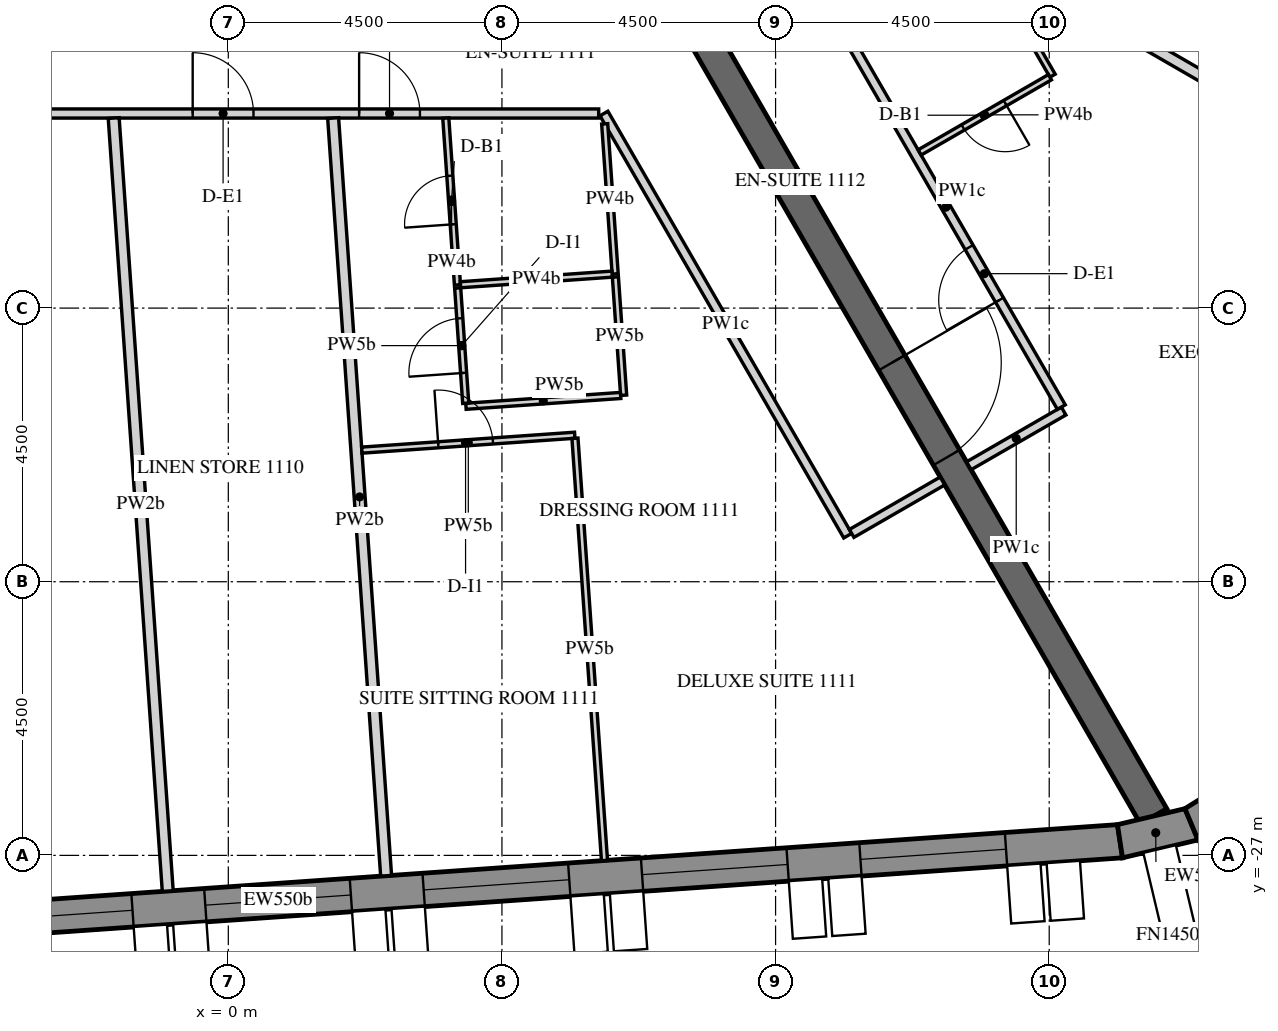
"""IFC4 building model, lengths in metres.
Left out: names, types, materials, properties, quantities, classifications, styles, units other than length and angle.
Written with IfcOpenShell. Run it as: python <this file> out.ifc"""

import sys

from ifc_helpers import new_model, si_unit, direction, frame, frame_2d, origin, place, context, subcontext, project, spatial, polyline, rectangle, outline, extrude, element, fill, save


model = new_model("IFC4")
c1 = context("Model", 3, precision=1e-05, world=origin(), true_north=direction((0.0, 1.0)))
c2 = subcontext(c1, "Body", "Model", "MODEL_VIEW")
j1 = project(units=[si_unit("LENGTHUNIT", "METRE"), si_unit("PLANEANGLEUNIT", "RADIAN")], contexts=[c1])
p1 = place(None, origin())
s1 = spatial("IfcSite", under=j1, at=p1, CompositionType="ELEMENT")
p2 = place(p1, origin())
s2 = spatial("IfcBuilding", under=s1, at=p2, CompositionType="ELEMENT")
p3 = place(p2, frame((0.0, 0.0, 152.7)))
s3 = spatial("IfcBuildingStorey", under=s2, at=p3, CompositionType="ELEMENT", Elevation=152.7)
p4 = place(p3, frame((-13.026, -28.704, 0.0), z_axis=(0.0, 0.0, 1.0), x_axis=(0.99756406806, 0.069756219185, 0.0)))
e1 = element("IfcWall", 1, at=p4, inside=s3, PredefinedType="SOLIDWALL", context=c2, shape_type="SweptSolid", body=[
    extrude(outline(polyline([(-0.026, -0.275), (27.78, -0.275), (27.735, 0.275), (0.026, 0.275), (-0.026, -0.275)])), origin(), (0.0, 0.0, 1.0), 3.75),
])
p5 = place(p4, frame((1.879, 0.0, 0.9)))
e2 = element("IfcOpeningElement", 2, at=p5, cuts=e1, PredefinedType="OPENING", context=c2, shape_type="SweptSolid", body=[
    extrude(rectangle(XDim=2.4, YDim=2.4, at=frame_2d((1.2, 1.2))), frame((0.0, 0.285, 0.0), z_axis=(0.0, -1.0, 0.0), x_axis=(1.0, 0.0, 0.0)), (0.0, 0.0, 1.0), 0.57),
])
p6 = place(p4, frame((5.479, 0.0, 0.9)))
e3 = element("IfcOpeningElement", 3, at=p6, cuts=e1, PredefinedType="OPENING", context=c2, shape_type="SweptSolid", body=[
    extrude(rectangle(XDim=2.4, YDim=2.4, at=frame_2d((1.2, 1.2))), frame((0.0, 0.285, 0.0), z_axis=(0.0, -1.0, 0.0), x_axis=(1.0, 0.0, 0.0)), (0.0, 0.0, 1.0), 0.57),
])
p7 = place(p4, frame((9.079, 0.0, 0.9)))
e4 = element("IfcOpeningElement", 4, at=p7, cuts=e1, PredefinedType="OPENING", context=c2, shape_type="SweptSolid", body=[
    extrude(rectangle(XDim=2.4, YDim=2.4, at=frame_2d((1.2, 1.2))), frame((0.0, 0.285, 0.0), z_axis=(0.0, -1.0, 0.0), x_axis=(1.0, 0.0, 0.0)), (0.0, 0.0, 1.0), 0.57),
])
p8 = place(p4, frame((12.679, 0.0, 0.9)))
e5 = element("IfcOpeningElement", 5, at=p8, cuts=e1, PredefinedType="OPENING", context=c2, shape_type="SweptSolid", body=[
    extrude(rectangle(XDim=2.4, YDim=2.4, at=frame_2d((1.2, 1.2))), frame((0.0, 0.285, 0.0), z_axis=(0.0, -1.0, 0.0), x_axis=(1.0, 0.0, 0.0)), (0.0, 0.0, 1.0), 0.57),
])
p9 = place(p4, frame((16.279, 0.0, 0.9)))
e6 = element("IfcOpeningElement", 6, at=p9, cuts=e1, PredefinedType="OPENING", context=c2, shape_type="SweptSolid", body=[
    extrude(rectangle(XDim=2.4, YDim=2.4, at=frame_2d((1.2, 1.2))), frame((0.0, 0.285, 0.0), z_axis=(0.0, -1.0, 0.0), x_axis=(1.0, 0.0, 0.0)), (0.0, 0.0, 1.0), 0.57),
])
p10 = place(p4, frame((19.879, 0.0, 0.9)))
e7 = element("IfcOpeningElement", 7, at=p10, cuts=e1, PredefinedType="OPENING", context=c2, shape_type="SweptSolid", body=[
    extrude(rectangle(XDim=2.4, YDim=2.4, at=frame_2d((1.2, 1.2))), frame((0.0, 0.285, 0.0), z_axis=(0.0, -1.0, 0.0), x_axis=(1.0, 0.0, 0.0)), (0.0, 0.0, 1.0), 0.57),
])
p11 = place(p4, frame((23.479, 0.0, 0.9)))
e8 = element("IfcOpeningElement", 8, at=p11, cuts=e1, PredefinedType="OPENING", context=c2, shape_type="SweptSolid", body=[
    extrude(rectangle(XDim=2.4, YDim=2.4, at=frame_2d((1.2, 1.2))), frame((0.0, 0.285, 0.0), z_axis=(0.0, -1.0, 0.0), x_axis=(1.0, 0.0, 0.0)), (0.0, 0.0, 1.0), 0.57),
])
p12 = place(p3, frame((14.664, -26.767, 0.0), z_axis=(0.0, 0.0, 1.0), x_axis=(0.973063591128, 0.230536868247, 0.0)))
e9 = element("IfcWall", 9, at=p12, inside=s3, PredefinedType="SOLIDWALL", context=c2, shape_type="SweptSolid", body=[
    extrude(outline(polyline([(-0.022, -0.275), (1.253, -0.275), (1.163, 0.275), (0.022, 0.275), (-0.022, -0.275)])), origin(), (0.0, 0.0, 1.0), 3.75),
])
p13 = place(p3, frame((15.84, -26.489, 0.0), z_axis=(0.0, 0.0, 1.0), x_axis=(0.848009655012, 0.52998077796, 0.0)))
e10 = element("IfcWall", 10, at=p13, inside=s3, PredefinedType="SOLIDWALL", context=c2, shape_type="SweptSolid", body=[
    extrude(outline(polyline([(-0.045, -0.275), (1.253, -0.275), (1.163, 0.275), (0.045, 0.275), (-0.045, -0.275)])), origin(), (0.0, 0.0, 1.0), 3.75),
])
p14 = place(p3, frame((7.506, -13.0, 0.0), z_axis=(0.0, 0.0, 1.0), x_axis=(0.499988271576, -0.866032175087, 0.0)))
e11 = element("IfcWall", 11, at=p14, inside=s3, PredefinedType="SHEAR", context=c2, shape_type="SweptSolid", body=[
    extrude(rectangle(XDim=15.424, YDim=0.5, at=frame_2d((7.712, 0.0))), origin(), (0.0, 0.0, 1.0), 3.75),
])
p15 = place(p14, frame((6.812, 0.0, 0.0)))
e12 = element("IfcOpeningElement", 12, at=p15, cuts=e11, PredefinedType="OPENING", context=c2, shape_type="SweptSolid", body=[
    extrude(rectangle(XDim=1.8, YDim=2.4, at=frame_2d((0.9, 1.2))), frame((0.0, 0.26, 0.0), z_axis=(0.0, -1.0, 0.0), x_axis=(1.0, 0.0, 0.0)), (0.0, 0.0, 1.0), 0.52),
])
p16 = place(p3, frame((-8.458, -14.8, 0.0), z_axis=(0.0, 0.0, 1.0), x_axis=(1.0, 0.0, 0.0)))
e13 = element("IfcWall", 13, at=p16, inside=s3, PredefinedType="PARTITIONING", context=c2, shape_type="SweptSolid", body=[
    extrude(rectangle(XDim=14.549, YDim=0.15, at=frame_2d((7.275, 0.0))), origin(), (0.0, 0.0, 1.0), 2.823),
])
p17 = place(p16, frame((4.375, 0.0, 0.0)))
e14 = element("IfcOpeningElement", 14, at=p17, cuts=e13, PredefinedType="OPENING", context=c2, shape_type="SweptSolid", body=[
    extrude(rectangle(XDim=1.0, YDim=2.1, at=frame_2d((0.5, 1.05))), frame((0.0, 0.085, 0.0), z_axis=(0.0, -1.0, 0.0), x_axis=(1.0, 0.0, 0.0)), (0.0, 0.0, 1.0), 0.17),
])
p18 = place(p16, frame((7.872, 0.0, 0.0)))
e15 = element("IfcOpeningElement", 15, at=p18, cuts=e13, PredefinedType="OPENING", context=c2, shape_type="SweptSolid", body=[
    extrude(rectangle(XDim=1.0, YDim=2.1, at=frame_2d((0.5, 1.05))), frame((0.0, 0.085, 0.0), z_axis=(0.0, -1.0, 0.0), x_axis=(1.0, 0.0, 0.0)), (0.0, 0.0, 1.0), 0.17),
])
p19 = place(p16, frame((10.609, 0.0, 0.0)))
e16 = element("IfcOpeningElement", 16, at=p19, cuts=e13, PredefinedType="OPENING", context=c2, shape_type="SweptSolid", body=[
    extrude(rectangle(XDim=1.0, YDim=2.1, at=frame_2d((0.5, 1.05))), frame((0.0, 0.085, 0.0), z_axis=(0.0, -1.0, 0.0), x_axis=(1.0, 0.0, 0.0)), (0.0, 0.0, 1.0), 0.17),
])
p20 = place(p3, frame((6.178, -14.8, 0.0), z_axis=(0.0, 0.0, 1.0), x_axis=(0.499984309814, -0.866034462328, 0.0)))
e17 = element("IfcWall", 17, at=p20, inside=s3, PredefinedType="PARTITIONING", context=c2, shape_type="SweptSolid", body=[
    extrude(rectangle(XDim=8.017, YDim=0.15, at=frame_2d((4.008, 0.0))), origin(), (0.0, 0.0, 1.0), 2.823),
])
p21 = place(p3, frame((10.251, -21.705, 0.0), z_axis=(0.0, 0.0, 1.0), x_axis=(0.866013532718, 0.500020560727, 0.0)))
e18 = element("IfcWall", 18, at=p21, inside=s3, PredefinedType="PARTITIONING", context=c2, shape_type="SweptSolid", body=[
    extrude(rectangle(XDim=1.725, YDim=0.15, at=frame_2d((0.863, 0.0))), origin(), (0.0, 0.0, 1.0), 2.823),
])
p22 = place(p3, frame((12.178, -20.593, 0.0), z_axis=(0.0, 0.0, 1.0), x_axis=(0.866047807691, 0.499961193289, 0.0)))
e19 = element("IfcWall", 19, at=p22, inside=s3, PredefinedType="PARTITIONING", context=c2, shape_type="SweptSolid", body=[
    extrude(rectangle(XDim=1.8, YDim=0.15, at=frame_2d((0.9, 0.0))), origin(), (0.0, 0.0, 1.0), 2.823),
])
p23 = place(p3, frame((13.699, -19.628, 0.0), z_axis=(0.0, 0.0, 1.0), x_axis=(-0.499998968938, 0.866025999068, 0.0)))
e20 = element("IfcWall", 20, at=p23, inside=s3, PredefinedType="PARTITIONING", context=c2, shape_type="SweptSolid", body=[
    extrude(rectangle(XDim=7.592, YDim=0.15, at=frame_2d((3.796, 0.0))), origin(), (0.0, 0.0, 1.0), 2.823),
])
p24 = place(p23, frame((2.033, 0.0, 0.0)))
e21 = element("IfcOpeningElement", 21, at=p24, cuts=e20, PredefinedType="OPENING", context=c2, shape_type="SweptSolid", body=[
    extrude(rectangle(XDim=1.0, YDim=2.1, at=frame_2d((0.5, 1.05))), frame((0.0, 0.085, 0.0), z_axis=(0.0, -1.0, 0.0), x_axis=(1.0, 0.0, 0.0)), (0.0, 0.0, 1.0), 0.17),
])
p25 = place(p3, frame((-0.996, -27.587, 0.0), z_axis=(0.0, 0.0, 1.0), x_axis=(-0.069758774678, 0.99756388936, 0.0)))
e22 = element("IfcWall", 22, at=p25, inside=s3, PredefinedType="PARTITIONING", context=c2, shape_type="SweptSolid", body=[
    extrude(rectangle(XDim=12.743, YDim=0.18, at=frame_2d((6.371, 0.0))), origin(), (0.0, 0.0, 1.0), 2.823),
])
p26 = place(p3, frame((2.595, -27.335, 0.0), z_axis=(0.0, 0.0, 1.0), x_axis=(-0.069757939761, 0.997563947745, 0.0)))
e23 = element("IfcWall", 23, at=p26, inside=s3, PredefinedType="PARTITIONING", context=c2, shape_type="SweptSolid", body=[
    extrude(rectangle(XDim=12.491, YDim=0.18, at=frame_2d((6.246, 0.0))), origin(), (0.0, 0.0, 1.0), 2.823),
])
p27 = place(p3, frame((3.769, -17.619, 0.0), z_axis=(0.0, 0.0, 1.0), x_axis=(-0.06975229722, 0.997564342302, 0.0)))
e24 = element("IfcWall", 24, at=p27, inside=s3, PredefinedType="PARTITIONING", context=c2, shape_type="SweptSolid", body=[
    extrude(rectangle(XDim=2.751, YDim=0.1, at=frame_2d((1.375, 0.0))), origin(), (0.0, 0.0, 1.0), 2.823),
])
p28 = place(p27, frame((1.0, 0.0, 0.0)))
e25 = element("IfcOpeningElement", 25, at=p28, cuts=e24, PredefinedType="OPENING", context=c2, shape_type="SweptSolid", body=[
    extrude(rectangle(XDim=0.8, YDim=2.1, at=frame_2d((0.4, 1.05))), frame((0.0, 0.06, 0.0), z_axis=(0.0, -1.0, 0.0), x_axis=(1.0, 0.0, 0.0)), (0.0, 0.0, 1.0), 0.12),
])
p29 = place(p3, frame((6.19, -14.971, 0.0), z_axis=(0.0, 0.0, 1.0), x_axis=(0.069689641529, -0.997568721374, 0.0)))
e26 = element("IfcWall", 26, at=p29, inside=s3, PredefinedType="PARTITIONING", context=c2, shape_type="SweptSolid", body=[
    extrude(rectangle(XDim=2.473, YDim=0.1, at=frame_2d((1.237, 0.0))), origin(), (0.0, 0.0, 1.0), 2.823),
])
p30 = place(p3, frame((6.366, -17.488, 0.0), z_axis=(0.0, 0.0, 1.0), x_axis=(0.069743152354, -0.997564981693, 0.0)))
e27 = element("IfcWall", 27, at=p30, inside=s3, PredefinedType="PARTITIONING", context=c2, shape_type="SweptSolid", body=[
    extrude(rectangle(XDim=1.95, YDim=0.1, at=frame_2d((0.975, 0.0))), origin(), (0.0, 0.0, 1.0), 2.823),
])
p31 = place(p3, frame((6.452, -19.437, 0.0), z_axis=(0.0, 0.0, 1.0), x_axis=(-0.997567829494, -0.069702407128, 0.0)))
e28 = element("IfcWall", 28, at=p31, inside=s3, PredefinedType="PARTITIONING", context=c2, shape_type="SweptSolid", body=[
    extrude(rectangle(XDim=2.55, YDim=0.1, at=frame_2d((1.275, 0.0))), origin(), (0.0, 0.0, 1.0), 2.823),
])
p32 = place(p3, frame((3.905, -19.565, 0.0), z_axis=(0.0, 0.0, 1.0), x_axis=(-0.069767755139, 0.997563261324, 0.0)))
e29 = element("IfcWall", 29, at=p32, inside=s3, PredefinedType="PARTITIONING", context=c2, shape_type="SweptSolid", body=[
    extrude(rectangle(XDim=1.9, YDim=0.1, at=frame_2d((0.95, 0.0))), origin(), (0.0, 0.0, 1.0), 2.823),
])
p33 = place(p32, frame((0.5, 0.0, 0.0)))
e30 = element("IfcOpeningElement", 30, at=p33, cuts=e29, PredefinedType="OPENING", context=c2, shape_type="SweptSolid", body=[
    extrude(rectangle(XDim=0.9, YDim=2.1, at=frame_2d((0.45, 1.05))), frame((0.0, 0.06, 0.0), z_axis=(0.0, -1.0, 0.0), x_axis=(1.0, 0.0, 0.0)), (0.0, 0.0, 1.0), 0.12),
])
p34 = place(p3, frame((2.196, -20.336, 0.0), z_axis=(0.0, 0.0, 1.0), x_axis=(0.997563180885, 0.069768905267, 0.0)))
e31 = element("IfcWall", 31, at=p34, inside=s3, PredefinedType="PARTITIONING", context=c2, shape_type="SweptSolid", body=[
    extrude(rectangle(XDim=3.51, YDim=0.1, at=frame_2d((1.755, 0.0))), origin(), (0.0, 0.0, 1.0), 2.823),
])
p35 = place(p34, frame((1.26, 0.0, 0.0)))
e32 = element("IfcOpeningElement", 32, at=p35, cuts=e31, PredefinedType="OPENING", context=c2, shape_type="SweptSolid", body=[
    extrude(rectangle(XDim=0.9, YDim=2.1, at=frame_2d((0.45, 1.05))), frame((0.0, 0.06, 0.0), z_axis=(0.0, -1.0, 0.0), x_axis=(1.0, 0.0, 0.0)), (0.0, 0.0, 1.0), 0.12),
])
p36 = place(p3, frame((5.701, -20.141, 0.0), z_axis=(0.0, 0.0, 1.0), x_axis=(0.069763857423, -0.997563533915, 0.0)))
e33 = element("IfcWall", 33, at=p36, inside=s3, PredefinedType="PARTITIONING", context=c2, shape_type="SweptSolid", body=[
    extrude(rectangle(XDim=6.96, YDim=0.1, at=frame_2d((3.48, 0.0))), origin(), (0.0, 0.0, 1.0), 2.823),
])
p37 = place(p3, frame((3.818, -17.616, 0.0), z_axis=(0.0, 0.0, 1.0), x_axis=(0.99755930726, 0.069824268692, 0.0)))
e34 = element("IfcWall", 34, at=p37, inside=s3, PredefinedType="PARTITIONING", context=c2, shape_type="SweptSolid", body=[
    extrude(rectangle(XDim=2.5, YDim=0.1, at=frame_2d((1.25, 0.0))), origin(), (0.0, 0.0, 1.0), 2.823),
])
p38 = place(p3, frame((12.426, -12.223, 0.0), z_axis=(0.0, 0.0, 1.0), x_axis=(0.499919032186, -0.866072145528, 0.0)))
e35 = element("IfcWall", 35, at=p38, inside=s3, PredefinedType="PARTITIONING", context=c2, shape_type="SweptSolid", body=[
    extrude(rectangle(XDim=2.258, YDim=0.1, at=frame_2d((1.129, 0.0))), origin(), (0.0, 0.0, 1.0), 2.823),
])
p39 = place(p3, frame((13.512, -14.203, 0.0), z_axis=(0.0, 0.0, 1.0), x_axis=(-0.866006523861, -0.500032699561, 0.0)))
e36 = element("IfcWall", 36, at=p39, inside=s3, PredefinedType="PARTITIONING", context=c2, shape_type="SweptSolid", body=[
    extrude(rectangle(XDim=2.475, YDim=0.1, at=frame_2d((1.237, 0.0))), origin(), (0.0, 0.0, 1.0), 2.823),
])
p40 = place(p39, frame((0.85, 0.0, 0.0)))
e37 = element("IfcOpeningElement", 37, at=p40, cuts=e36, PredefinedType="OPENING", context=c2, shape_type="SweptSolid", body=[
    extrude(rectangle(XDim=0.8, YDim=2.1, at=frame_2d((0.4, 1.05))), frame((0.0, 0.06, 0.0), z_axis=(0.0, -1.0, 0.0), x_axis=(1.0, 0.0, 0.0)), (0.0, 0.0, 1.0), 0.12),
])
p41 = place(p3, frame((21.631, -17.433, 0.0), z_axis=(0.0, 0.0, 1.0), x_axis=(-0.866031296205, 0.499989793889, 0.0)))
e38 = element("IfcWall", 38, at=p41, inside=s3, PredefinedType="PARTITIONING", context=c2, shape_type="SweptSolid", body=[
    extrude(rectangle(XDim=11.067, YDim=0.18, at=frame_2d((5.534, 0.0))), origin(), (0.0, 0.0, 1.0), 2.823),
])
p42 = place(p7, frame((0.0, 0.205, 0.0)))
e39 = element("IfcWindow", 39, at=p42, inside=s3, PartitioningType="DOUBLE_PANEL_VERTICAL", PredefinedType="WINDOW", context=c2, shape_type="SweptSolid", body=[
    extrude(rectangle(XDim=2.4, YDim=2.4, at=frame_2d((1.2, 1.2))), frame((0.0, 0.03, 0.0), z_axis=(0.0, -1.0, 0.0), x_axis=(1.0, 0.0, 0.0)), (0.0, 0.0, 1.0), 0.06),
])
fill(e4, e39)
p43 = place(p8, frame((0.0, 0.205, 0.0)))
e40 = element("IfcWindow", 40, at=p43, inside=s3, PartitioningType="DOUBLE_PANEL_VERTICAL", PredefinedType="WINDOW", context=c2, shape_type="SweptSolid", body=[
    extrude(rectangle(XDim=2.4, YDim=2.4, at=frame_2d((1.2, 1.2))), frame((0.0, 0.03, 0.0), z_axis=(0.0, -1.0, 0.0), x_axis=(1.0, 0.0, 0.0)), (0.0, 0.0, 1.0), 0.06),
])
fill(e5, e40)
p44 = place(p9, frame((0.0, 0.205, 0.0)))
e41 = element("IfcWindow", 41, at=p44, inside=s3, PartitioningType="DOUBLE_PANEL_VERTICAL", PredefinedType="WINDOW", context=c2, shape_type="SweptSolid", body=[
    extrude(rectangle(XDim=2.4, YDim=2.4, at=frame_2d((1.2, 1.2))), frame((0.0, 0.03, 0.0), z_axis=(0.0, -1.0, 0.0), x_axis=(1.0, 0.0, 0.0)), (0.0, 0.0, 1.0), 0.06),
])
fill(e6, e41)
p45 = place(p10, frame((0.0, 0.205, 0.0)))
e42 = element("IfcWindow", 42, at=p45, inside=s3, PartitioningType="DOUBLE_PANEL_VERTICAL", PredefinedType="WINDOW", context=c2, shape_type="SweptSolid", body=[
    extrude(rectangle(XDim=2.4, YDim=2.4, at=frame_2d((1.2, 1.2))), frame((0.0, 0.03, 0.0), z_axis=(0.0, -1.0, 0.0), x_axis=(1.0, 0.0, 0.0)), (0.0, 0.0, 1.0), 0.06),
])
fill(e7, e42)
p46 = place(p11, frame((0.0, 0.205, 0.0)))
e43 = element("IfcWindow", 43, at=p46, inside=s3, PartitioningType="DOUBLE_PANEL_VERTICAL", PredefinedType="WINDOW", context=c2, shape_type="SweptSolid", body=[
    extrude(rectangle(XDim=2.4, YDim=2.4, at=frame_2d((1.2, 1.2))), frame((0.0, 0.03, 0.0), z_axis=(0.0, -1.0, 0.0), x_axis=(1.0, 0.0, 0.0)), (0.0, 0.0, 1.0), 0.06),
])
fill(e8, e43)
p47 = place(p15, origin())
e44 = element("IfcDoor", 44, at=p47, inside=s3, OperationType="DOUBLE_DOOR_SINGLE_SWING", PredefinedType="DOOR", context=c2, shape_type="SweptSolid", body=[
    extrude(rectangle(XDim=1.8, YDim=2.4, at=frame_2d((0.9, 1.2))), frame((0.0, 0.025, 0.0), z_axis=(0.0, -1.0, 0.0), x_axis=(1.0, 0.0, 0.0)), (0.0, 0.0, 1.0), 0.05),
])
fill(e12, e44)
p48 = place(p18, origin())
e45 = element("IfcDoor", 45, at=p48, inside=s3, OperationType="SINGLE_SWING_RIGHT", PredefinedType="DOOR", context=c2, shape_type="SweptSolid", body=[
    extrude(rectangle(XDim=1.0, YDim=2.1, at=frame_2d((0.5, 1.05))), frame((0.0, 0.025, 0.0), z_axis=(0.0, -1.0, 0.0), x_axis=(1.0, 0.0, 0.0)), (0.0, 0.0, 1.0), 0.05),
])
fill(e15, e45)
p49 = place(p19, origin())
e46 = element("IfcDoor", 46, at=p49, inside=s3, OperationType="SINGLE_SWING_RIGHT", PredefinedType="DOOR", context=c2, shape_type="SweptSolid", body=[
    extrude(rectangle(XDim=1.0, YDim=2.1, at=frame_2d((0.5, 1.05))), frame((0.0, 0.025, 0.0), z_axis=(0.0, -1.0, 0.0), x_axis=(1.0, 0.0, 0.0)), (0.0, 0.0, 1.0), 0.05),
])
fill(e16, e46)
p50 = place(p28, origin())
e47 = element("IfcDoor", 47, at=p50, inside=s3, OperationType="SINGLE_SWING_RIGHT", PredefinedType="DOOR", context=c2, shape_type="SweptSolid", body=[
    extrude(rectangle(XDim=0.8, YDim=2.1, at=frame_2d((0.4, 1.05))), frame((0.0, 0.025, 0.0), z_axis=(0.0, -1.0, 0.0), x_axis=(1.0, 0.0, 0.0)), (0.0, 0.0, 1.0), 0.05),
])
fill(e25, e47)
p51 = place(p33, origin())
e48 = element("IfcDoor", 48, at=p51, inside=s3, OperationType="SINGLE_SWING_RIGHT", PredefinedType="DOOR", context=c2, shape_type="SweptSolid", body=[
    extrude(rectangle(XDim=0.9, YDim=2.1, at=frame_2d((0.45, 1.05))), frame((0.0, 0.025, 0.0), z_axis=(0.0, -1.0, 0.0), x_axis=(1.0, 0.0, 0.0)), (0.0, 0.0, 1.0), 0.05),
])
fill(e30, e48)
p52 = place(p35, origin())
e49 = element("IfcDoor", 49, at=p52, inside=s3, OperationType="SINGLE_SWING_RIGHT", PredefinedType="DOOR", context=c2, shape_type="SweptSolid", body=[
    extrude(rectangle(XDim=0.9, YDim=2.1, at=frame_2d((0.45, 1.05))), frame((0.0, 0.025, 0.0), z_axis=(0.0, -1.0, 0.0), x_axis=(1.0, 0.0, 0.0)), (0.0, 0.0, 1.0), 0.05),
])
fill(e32, e49)
p53 = place(p24, origin())
e50 = element("IfcDoor", 50, at=p53, inside=s3, OperationType="SINGLE_SWING_LEFT", PredefinedType="DOOR", context=c2, shape_type="SweptSolid", body=[
    extrude(rectangle(XDim=1.0, YDim=2.1, at=frame_2d((0.5, 1.05))), frame((0.0, 0.025, 0.0), z_axis=(0.0, -1.0, 0.0), x_axis=(1.0, 0.0, 0.0)), (0.0, 0.0, 1.0), 0.05),
])
fill(e21, e50)
p54 = place(p40, origin())
e51 = element("IfcDoor", 51, at=p54, inside=s3, OperationType="SINGLE_SWING_RIGHT", PredefinedType="DOOR", context=c2, shape_type="SweptSolid", body=[
    extrude(rectangle(XDim=0.8, YDim=2.1, at=frame_2d((0.4, 1.05))), frame((0.0, 0.025, 0.0), z_axis=(0.0, -1.0, 0.0), x_axis=(1.0, 0.0, 0.0)), (0.0, 0.0, 1.0), 0.05),
])
fill(e37, e51)
save(model, sys.argv[1])
